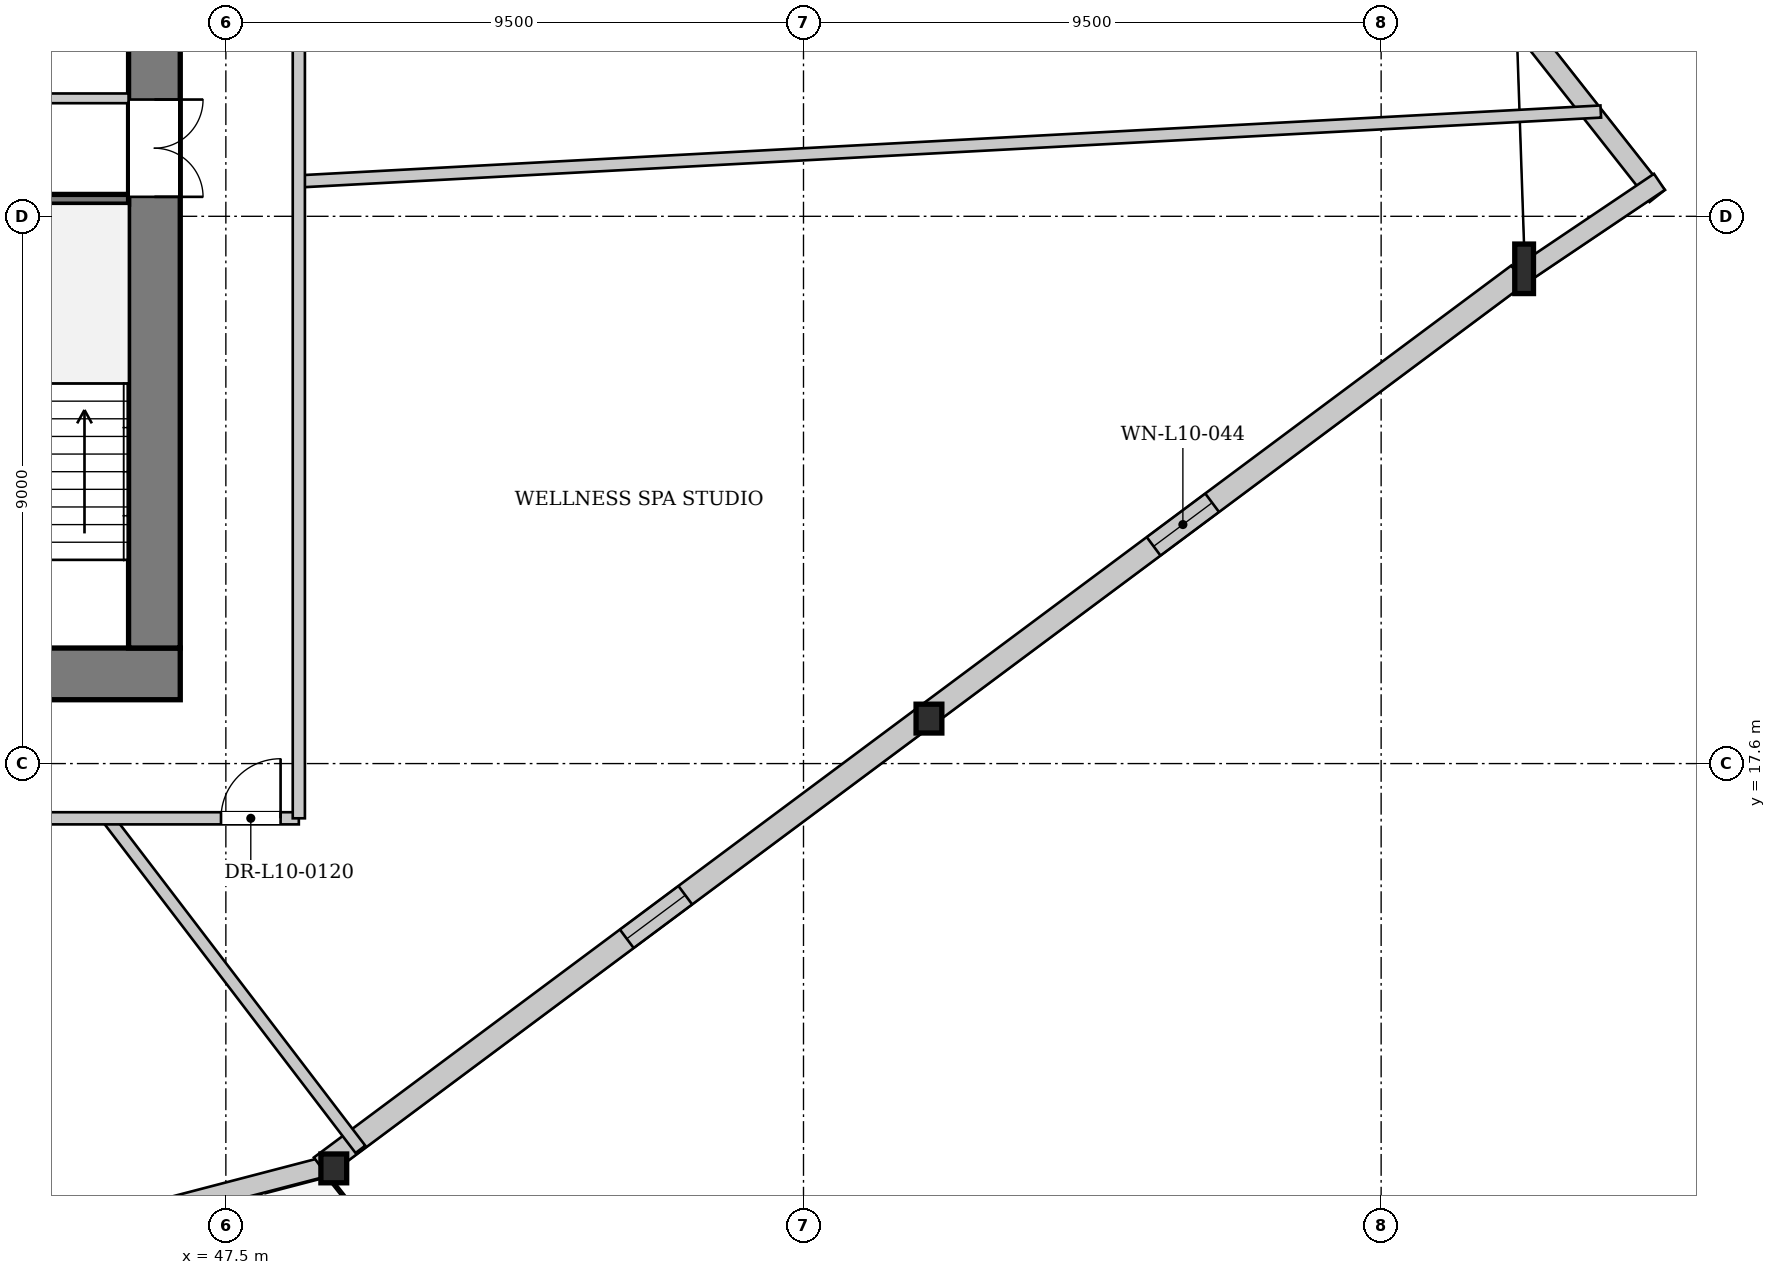
"""IFC4 building model, lengths in metres.
Left out: names, types, materials, properties, quantities, classifications, styles, units other than length and angle.
Written with IfcOpenShell. Run it as: python <this file> out.ifc"""

import sys

from ifc_helpers import new_model, si_unit, direction, frame, frame_2d, origin, origin_2d, place, context, subcontext, project, spatial, rectangle, i_section, extrude, source, transform, mapped, element, fill, save


model = new_model("IFC4")
c1 = context("Model", 3, precision=1e-05, world=origin(), true_north=direction((0.0, 1.0)))
c2 = subcontext(c1, "Body", "Model", "MODEL_VIEW")
j1 = project(units=[si_unit("LENGTHUNIT", "METRE"), si_unit("PLANEANGLEUNIT", "RADIAN")], contexts=[c1])
p1 = place(None, origin())
s1 = spatial("IfcSite", under=j1, at=p1, CompositionType="ELEMENT")
p2 = place(p1, origin())
s2 = spatial("IfcBuilding", under=s1, at=p2, CompositionType="ELEMENT")
p3 = place(p2, frame((0.0, 0.0, 43.5)))
s3 = spatial("IfcBuildingStorey", under=s2, at=p3, CompositionType="ELEMENT", Elevation=43.5)
m1 = source(origin(), c2, "Body", "SweptSolid", [
    extrude(i_section(OverallWidth=0.308, OverallDepth=0.814, WebThickness=0.021, FlangeThickness=0.04, at=origin_2d()), origin(), (0.0, 0.0, 1.0), 3.422),
])
p4 = place(p3, frame((68.867, 25.486, 0.0), z_axis=(-0.009203169224, 0.146537283616, 0.989162335609), x_axis=(-0.998033626119, -0.062680787619, 0.0)))
e1 = element("IfcColumn", 1, at=p4, inside=s3, PredefinedType="COLUMN", context=c2, shape_type="MappedRepresentation", body=[
    mapped(m1, transform((0.0, 0.0, 0.0), x_axis=(1.0, 0.0, 0.0), y_axis=(0.0, 1.0, 0.0), z_axis=(0.0, 0.0, 1.0), scale=1.0)),
])
m2 = source(origin(), c2, "Body", "SweptSolid", [
    extrude(i_section(OverallWidth=0.424, OverallDepth=0.474, WebThickness=0.043, FlangeThickness=0.068, at=origin_2d()), origin(), (0.0, 0.0, 1.0), 3.4),
])
p5 = place(p3, frame((49.174, 10.817, 0.0), z_axis=(0.059235895366, 0.07366791351, 0.995522047581), x_axis=(-0.779310211571, 0.626638328018, 0.0)))
e2 = element("IfcColumn", 2, at=p5, inside=s3, PredefinedType="COLUMN", context=c2, shape_type="MappedRepresentation", body=[
    mapped(m2, transform((0.0, 0.0, 0.0), x_axis=(1.0, 0.0, 0.0), y_axis=(0.0, 1.0, 0.0), z_axis=(0.0, 0.0, 1.0), scale=1.0)),
])
m3 = source(origin(), c2, "Body", "SweptSolid", [
    extrude(i_section(OverallWidth=0.424, OverallDepth=0.474, WebThickness=0.043, FlangeThickness=0.068, at=origin_2d()), origin(), (0.0, 0.0, 1.0), 3.407),
])
p6 = place(p3, frame((59.021, 18.152, 0.0), z_axis=(0.024938008928, 0.1103578556, 0.993579005121), x_axis=(-0.975405871546, 0.220416391752, 0.0)))
e3 = element("IfcColumn", 3, at=p6, inside=s3, PredefinedType="COLUMN", context=c2, shape_type="MappedRepresentation", body=[
    mapped(m3, transform((0.0, 0.0, 0.0), x_axis=(1.0, 0.0, 0.0), y_axis=(0.0, 1.0, 0.0), z_axis=(0.0, 0.0, 1.0), scale=1.0)),
])
p7 = place(p3, frame((49.134, 10.972, 0.0), z_axis=(0.0, 0.0, 1.0), x_axis=(-0.967626668542, -0.252385875847, 0.0)))
e4 = element("IfcWall", 4, at=p7, inside=s3, PredefinedType="SOLIDWALL", context=c2, shape_type="SweptSolid", body=[
    extrude(rectangle(XDim=24.556, YDim=0.32, at=frame_2d((12.278, 0.0))), origin(), (0.0, 0.0, 1.0), 2.592),
])
p8 = place(p7, frame((7.308, 0.0, 0.0)))
e5 = element("IfcOpeningElement", 5, at=p8, cuts=e4, PredefinedType="OPENING", context=c2, shape_type="SweptSolid", body=[
    extrude(rectangle(XDim=1.1, YDim=2.3, at=frame_2d((0.55, 1.15))), frame((0.0, 0.17, 0.0), z_axis=(0.0, -1.0, 0.0), x_axis=(1.0, 0.0, 0.0)), (0.0, 0.0, 1.0), 0.34),
])
p9 = place(p7, frame((17.071, 0.0, 0.272)))
e6 = element("IfcOpeningElement", 6, at=p9, cuts=e4, PredefinedType="OPENING", context=c2, shape_type="SweptSolid", body=[
    extrude(rectangle(XDim=1.8, YDim=2.2, at=frame_2d((0.9, 1.1))), frame((0.0, 0.17, 0.0), z_axis=(0.0, -1.0, 0.0), x_axis=(1.0, 0.0, 0.0)), (0.0, 0.0, 1.0), 0.34),
])
p10 = place(p3, frame((68.583, 30.054, 0.0), z_axis=(0.0, 0.0, 1.0), x_axis=(0.618904414078, -0.78546631133, 0.0)))
e7 = element("IfcWall", 7, at=p10, inside=s3, PredefinedType="SOLIDWALL", context=c2, shape_type="SweptSolid", body=[
    extrude(rectangle(XDim=3.971, YDim=0.32, at=frame_2d((1.985, 0.0))), origin(), (0.0, 0.0, 1.0), 2.592),
])
p11 = place(p3, frame((71.077, 27.167, 0.0), z_axis=(0.0, 0.0, 1.0), x_axis=(-0.829425264913, -0.558617695678, 0.0)))
e8 = element("IfcWall", 8, at=p11, inside=s3, PredefinedType="SOLIDWALL", context=c2, shape_type="SweptSolid", body=[
    extrude(rectangle(XDim=2.771, YDim=0.32, at=frame_2d((1.386, 0.0))), origin(), (0.0, 0.0, 1.0), 2.592),
])
p12 = place(p3, frame((68.754, 25.638, 0.0), z_axis=(0.0, 0.0, 1.0), x_axis=(-0.801982102685, -0.59734806183, 0.0)))
e9 = element("IfcWall", 9, at=p12, inside=s3, PredefinedType="SOLIDWALL", context=c2, shape_type="SweptSolid", body=[
    extrude(rectangle(XDim=24.556, YDim=0.38, at=frame_2d((12.278, 0.0))), origin(), (0.0, 0.0, 1.0), 2.592),
])
p13 = place(p12, frame((6.276, 0.0, 0.65)))
e10 = element("IfcOpeningElement", 10, at=p13, cuts=e9, PredefinedType="OPENING", context=c2, shape_type="SweptSolid", body=[
    extrude(rectangle(XDim=1.2, YDim=1.5, at=frame_2d((0.6, 0.75))), frame((0.0, 0.2, 0.0), z_axis=(0.0, -1.0, 0.0), x_axis=(1.0, 0.0, 0.0)), (0.0, 0.0, 1.0), 0.4),
])
p14 = place(p12, frame((17.08, 0.0, 0.65)))
e11 = element("IfcOpeningElement", 11, at=p14, cuts=e9, PredefinedType="OPENING", context=c2, shape_type="SweptSolid", body=[
    extrude(rectangle(XDim=1.2, YDim=1.5, at=frame_2d((0.6, 0.75))), frame((0.0, 0.2, 0.0), z_axis=(0.0, -1.0, 0.0), x_axis=(1.0, 0.0, 0.0)), (0.0, 0.0, 1.0), 0.4),
])
p15 = place(p3, frame((46.75, 19.075, 0.0), z_axis=(0.0, 0.0, 1.0), x_axis=(-1.0, 0.0, 0.0)))
e12 = element("IfcWall", 12, at=p15, inside=s3, PredefinedType="SHEAR", context=c2, shape_type="SweptSolid", body=[
    extrude(rectangle(XDim=17.5, YDim=0.85, at=frame_2d((8.75, 0.0))), origin(), (0.0, 0.0, 1.0), 3.3),
])
p16 = place(p15, frame((4.95, 0.0, 0.0)))
e13 = element("IfcOpeningElement", 13, at=p16, cuts=e12, PredefinedType="OPENING", context=c2, shape_type="SweptSolid", body=[
    extrude(rectangle(XDim=1.12, YDim=2.25, at=frame_2d((0.56, 1.125))), frame((0.0, 0.435, 0.0), z_axis=(0.0, -1.0, 0.0), x_axis=(1.0, 0.0, 0.0)), (0.0, 0.0, 1.0), 0.87),
])
p17 = place(p15, frame((11.45, 0.0, 0.0)))
e14 = element("IfcOpeningElement", 14, at=p17, cuts=e12, PredefinedType="OPENING", context=c2, shape_type="SweptSolid", body=[
    extrude(rectangle(XDim=1.12, YDim=2.25, at=frame_2d((0.56, 1.125))), frame((0.0, 0.435, 0.0), z_axis=(0.0, -1.0, 0.0), x_axis=(1.0, 0.0, 0.0)), (0.0, 0.0, 1.0), 0.87),
])
p18 = place(p3, frame((46.325, 33.7, 0.0), z_axis=(0.0, 0.0, 1.0), x_axis=(0.0, -1.0, 0.0)))
e15 = element("IfcWall", 15, at=p18, inside=s3, PredefinedType="SHEAR", context=c2, shape_type="SweptSolid", body=[
    extrude(rectangle(XDim=14.2, YDim=0.85, at=frame_2d((7.1, 0.0))), origin(), (0.0, 0.0, 1.0), 3.3),
])
p19 = place(p18, frame((5.18, 0.0, 0.0)))
e16 = element("IfcOpeningElement", 16, at=p19, cuts=e15, PredefinedType="OPENING", context=c2, shape_type="SweptSolid", body=[
    extrude(rectangle(XDim=1.6, YDim=2.2, at=frame_2d((0.8, 1.1))), frame((0.0, 0.435, 0.0), z_axis=(0.0, -1.0, 0.0), x_axis=(1.0, 0.0, 0.0)), (0.0, 0.0, 1.0), 0.87),
])
p20 = place(p3, frame((42.88, 26.88, 0.0), z_axis=(0.0, 0.0, 1.0), x_axis=(1.0, 0.0, 0.0)))
e17 = element("IfcWall", 17, at=p20, inside=s3, PredefinedType="PARTITIONING", context=c2, shape_type="SweptSolid", body=[
    extrude(rectangle(XDim=3.02, YDim=0.16, at=frame_2d((1.51, 0.0))), origin(), (0.0, 0.0, 1.0), 3.3),
])
p21 = place(p3, frame((33.28, 28.54, 0.0), z_axis=(0.0, 0.0, 1.0), x_axis=(1.0, 0.0, 0.0)))
e18 = element("IfcWall", 18, at=p21, inside=s3, PredefinedType="PARTITIONING", context=c2, shape_type="SweptSolid", body=[
    extrude(rectangle(XDim=12.62, YDim=0.16, at=frame_2d((6.31, 0.0))), origin(), (0.0, 0.0, 1.0), 3.3),
])
p22 = place(p3, frame((45.557, 16.7, 0.0), z_axis=(0.0, 0.0, 1.0), x_axis=(0.606788320392, -0.794863468928, 0.0)))
e19 = element("IfcWall", 19, at=p22, inside=s3, PredefinedType="PARTITIONING", context=c2, shape_type="SweptSolid", body=[
    extrude(rectangle(XDim=6.849, YDim=0.2, at=frame_2d((3.424, 0.0))), origin(), (0.0, 0.0, 1.0), 2.785),
])
p23 = place(p3, frame((48.7, 27.174, 0.0), z_axis=(0.0, 0.0, 1.0), x_axis=(0.998563490956, 0.053581288992, 0.0)))
e20 = element("IfcWall", 20, at=p23, inside=s3, PredefinedType="PARTITIONING", context=c2, shape_type="SweptSolid", body=[
    extrude(rectangle(XDim=21.443, YDim=0.2, at=frame_2d((10.721, 0.0))), origin(), (0.0, 0.0, 1.0), 2.795),
])
p24 = place(p3, frame((27.3, 16.7, 0.0), z_axis=(0.0, 0.0, 1.0), x_axis=(1.0, 0.0, 0.0)))
e21 = element("IfcWall", 21, at=p24, inside=s3, PredefinedType="PARTITIONING", context=c2, shape_type="SweptSolid", body=[
    extrude(rectangle(XDim=21.4, YDim=0.2, at=frame_2d((10.7, 0.0))), origin(), (0.0, 0.0, 1.0), 3.3),
])
p25 = place(p24, frame((12.99, 0.0, 0.0)))
e22 = element("IfcOpeningElement", 22, at=p25, cuts=e21, PredefinedType="OPENING", context=c2, shape_type="SweptSolid", body=[
    extrude(rectangle(XDim=0.98, YDim=2.15, at=frame_2d((0.49, 1.075))), frame((0.0, 0.11, 0.0), z_axis=(0.0, -1.0, 0.0), x_axis=(1.0, 0.0, 0.0)), (0.0, 0.0, 1.0), 0.22),
])
p26 = place(p24, frame((20.12, 0.0, 0.0)))
e23 = element("IfcOpeningElement", 23, at=p26, cuts=e21, PredefinedType="OPENING", context=c2, shape_type="SweptSolid", body=[
    extrude(rectangle(XDim=0.98, YDim=2.15, at=frame_2d((0.49, 1.075))), frame((0.0, 0.11, 0.0), z_axis=(0.0, -1.0, 0.0), x_axis=(1.0, 0.0, 0.0)), (0.0, 0.0, 1.0), 0.22),
])
p27 = place(p24, frame((0.3, 0.0, 0.0)))
e24 = element("IfcOpeningElement", 24, at=p27, cuts=e21, PredefinedType="OPENING", context=c2, shape_type="SweptSolid", body=[
    extrude(rectangle(XDim=0.98, YDim=2.15, at=frame_2d((0.49, 1.075))), frame((0.0, 0.11, 0.0), z_axis=(0.0, -1.0, 0.0), x_axis=(1.0, 0.0, 0.0)), (0.0, 0.0, 1.0), 0.22),
])
p28 = place(p3, frame((48.7, 16.7, 0.0), z_axis=(0.0, 0.0, 1.0), x_axis=(0.0, 1.0, 0.0)))
e25 = element("IfcWall", 25, at=p28, inside=s3, PredefinedType="PARTITIONING", context=c2, shape_type="SweptSolid", body=[
    extrude(rectangle(XDim=19.8, YDim=0.2, at=frame_2d((9.9, 0.0))), origin(), (0.0, 0.0, 1.0), 3.3),
])
m4 = source(origin(), c2, "Body", "SweptSolid", [
    extrude(rectangle(XDim=1.2, YDim=1.5, at=frame_2d((0.6, 0.75))), frame((0.0, 0.03, 0.0), z_axis=(0.0, -1.0, 0.0), x_axis=(1.0, 0.0, 0.0)), (0.0, 0.0, 1.0), 0.06),
])
p29 = place(p13, origin())
e26 = element("IfcWindow", 26, at=p29, inside=s3, PartitioningType="SINGLE_PANEL", PredefinedType="WINDOW", context=c2, shape_type="MappedRepresentation", body=[
    mapped(m4, transform((0.0, 0.0, 0.0), x_axis=(1.0, 0.0, 0.0), y_axis=(0.0, 1.0, 0.0), z_axis=(0.0, 0.0, 1.0), scale=1.0)),
])
fill(e10, e26)
p30 = place(p14, origin())
e27 = element("IfcWindow", 27, at=p30, inside=s3, PartitioningType="SINGLE_PANEL", PredefinedType="WINDOW", context=c2, shape_type="MappedRepresentation", body=[
    mapped(m4, transform((0.0, 0.0, 0.0), x_axis=(1.0, 0.0, 0.0), y_axis=(0.0, 1.0, 0.0), z_axis=(0.0, 0.0, 1.0), scale=1.0)),
])
fill(e11, e27)
m5 = source(origin(), c2, "Body", "SweptSolid", [
    extrude(rectangle(XDim=1.6, YDim=2.2, at=frame_2d((0.8, 1.1))), frame((0.0, 0.025, 0.0), z_axis=(0.0, -1.0, 0.0), x_axis=(1.0, 0.0, 0.0)), (0.0, 0.0, 1.0), 0.05),
])
p31 = place(p19, origin())
e28 = element("IfcDoor", 28, at=p31, inside=s3, OperationType="DOUBLE_DOOR_SINGLE_SWING", PredefinedType="DOOR", context=c2, shape_type="MappedRepresentation", body=[
    mapped(m5, transform((0.0, 0.0, 0.0), x_axis=(1.0, 0.0, 0.0), y_axis=(0.0, 1.0, 0.0), z_axis=(0.0, 0.0, 1.0), scale=1.0)),
])
fill(e16, e28)
m6 = source(origin(), c2, "Body", "SweptSolid", [
    extrude(rectangle(XDim=0.98, YDim=2.15, at=frame_2d((0.49, 1.075))), frame((0.0, 0.025, 0.0), z_axis=(0.0, -1.0, 0.0), x_axis=(1.0, 0.0, 0.0)), (0.0, 0.0, 1.0), 0.05),
])
p32 = place(p26, origin())
e29 = element("IfcDoor", 29, at=p32, inside=s3, OperationType="SINGLE_SWING_RIGHT", PredefinedType="DOOR", context=c2, shape_type="MappedRepresentation", body=[
    mapped(m6, transform((0.0, 0.0, 0.0), x_axis=(1.0, 0.0, 0.0), y_axis=(0.0, 1.0, 0.0), z_axis=(0.0, 0.0, 1.0), scale=1.0)),
])
fill(e23, e29)
save(model, sys.argv[1])
